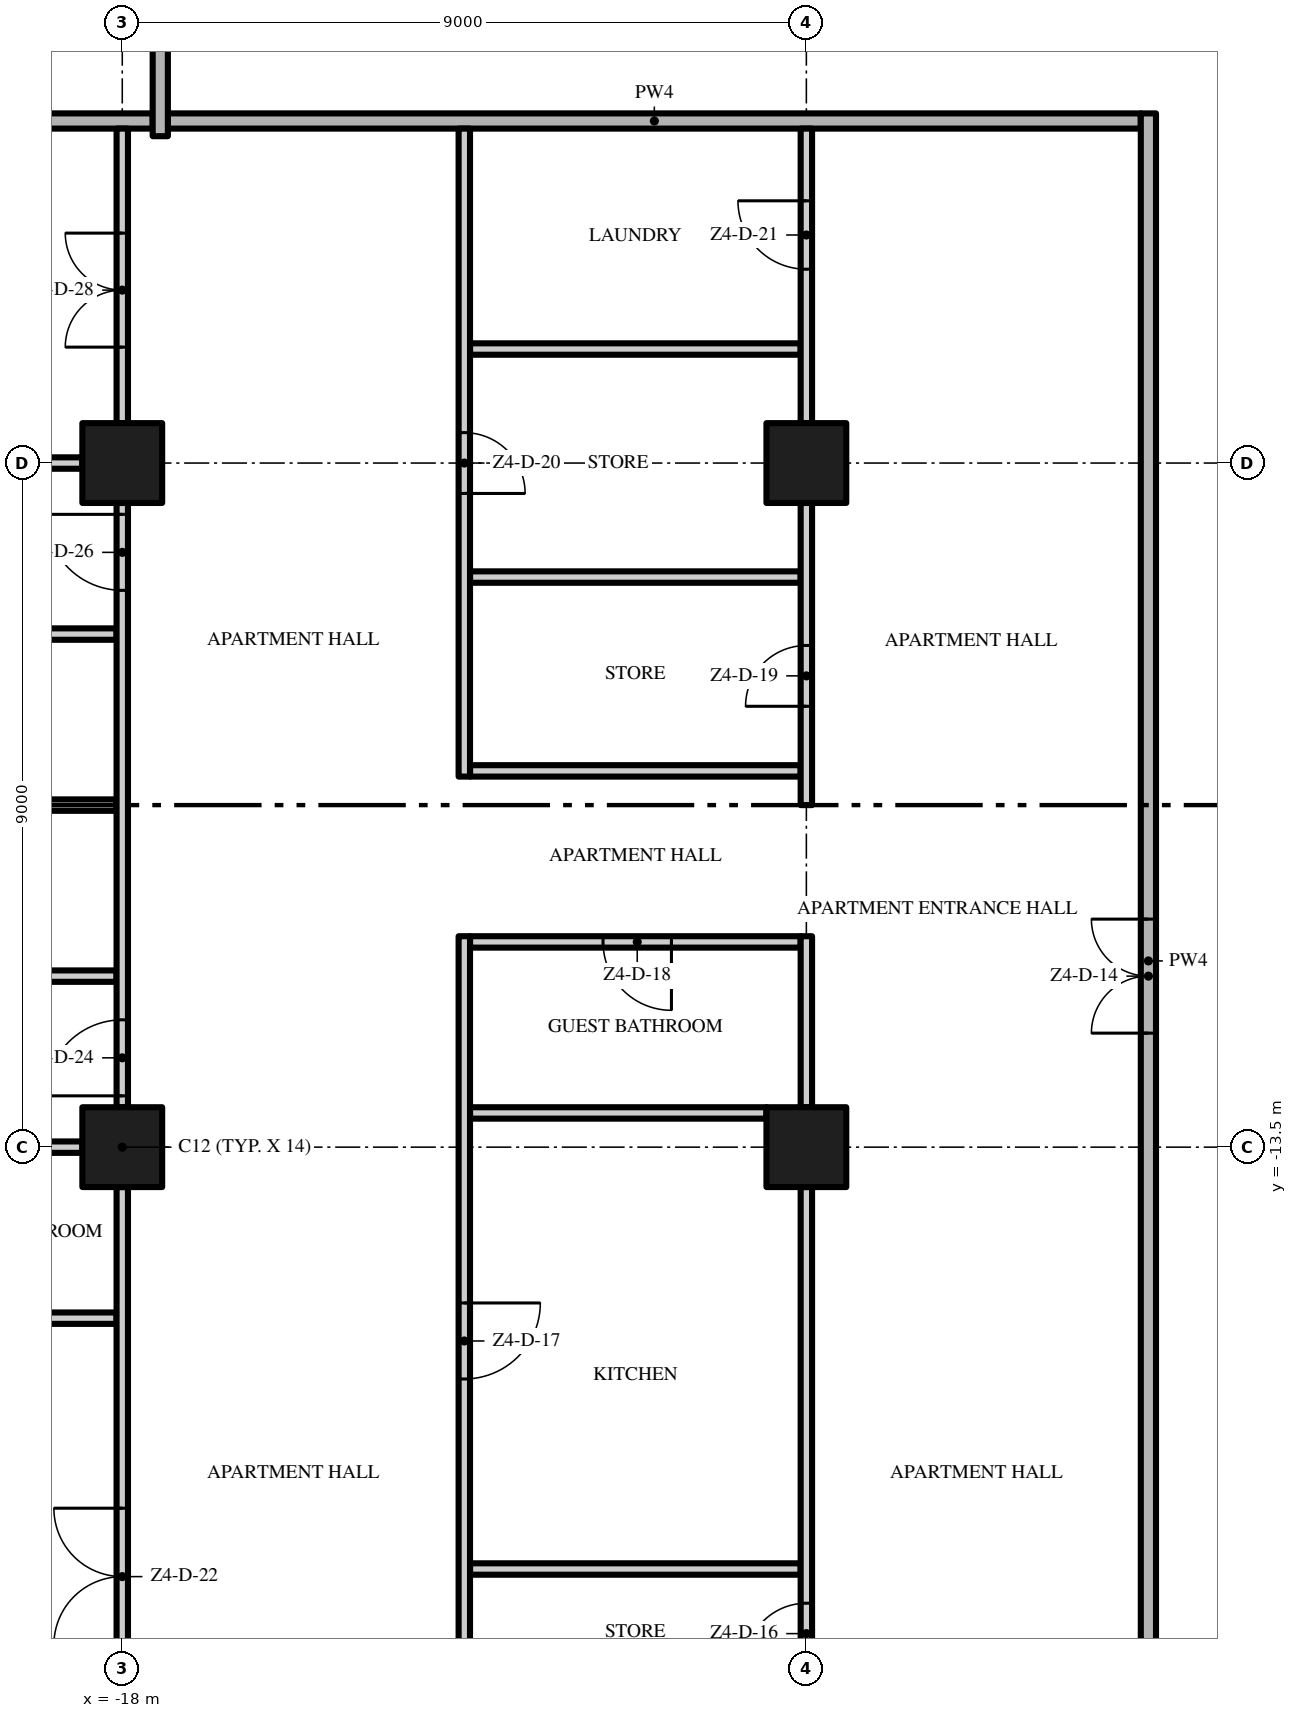
"""IFC4 building model, lengths in metres.
Left out: names, types, materials, properties, quantities, classifications, styles, units other than length and angle.
Written with IfcOpenShell. Run it as: python <this file> out.ifc"""

import sys

from ifc_helpers import new_model, si_unit, direction, frame, frame_2d, origin, origin_2d, place, context, subcontext, project, spatial, rectangle, extrude, element, fill, save


model = new_model("IFC4")
c1 = context("Model", 3, precision=1e-05, world=origin(), true_north=direction((0.0, 1.0)))
c2 = subcontext(c1, "Body", "Model", "MODEL_VIEW")
j1 = project(units=[si_unit("LENGTHUNIT", "METRE"), si_unit("PLANEANGLEUNIT", "RADIAN")], contexts=[c1])
p1 = place(None, origin())
s1 = spatial("IfcSite", under=j1, at=p1, CompositionType="ELEMENT")
p2 = place(p1, origin())
s2 = spatial("IfcBuilding", under=s1, at=p2, CompositionType="ELEMENT")
p3 = place(p2, frame((0.0, 0.0, 222.4)))
s3 = spatial("IfcBuildingStorey", under=s2, at=p3, CompositionType="ELEMENT", Elevation=222.4)
for number, where, z_axis, x_axis in (
    (1, (-18.0, -13.5, 0.0), (0.0, 0.0, 1.0), (1.0, 0.0, 0.0)),
    (2, (-18.0, -4.5, 0.0), (0.0, 0.0, 1.0), (1.0, 0.0, 0.0)),
    (3, (-9.0, -13.5, 0.0), (0.0, 0.0, 1.0), (1.0, 0.0, 0.0)),
    (4, (-9.0, -4.5, 0.0), (0.0, 0.0, 1.0), (1.0, 0.0, 0.0)),
):
    element("IfcColumn", number, at=place(p3, frame(where, z_axis=z_axis, x_axis=x_axis)), inside=s3, PredefinedType="COLUMN", context=c2, shape_type="SweptSolid", body=[
        extrude(rectangle(XDim=1.05, YDim=1.05, at=origin_2d()), origin(), (0.0, 0.0, 1.0), 3.5),
    ])
p4 = place(p3, frame((-13.425, -19.05, 0.0), z_axis=(0.0, 0.0, 1.0), x_axis=(1.0, 0.0, 0.0)))
e5 = element("IfcWall", 5, at=p4, inside=s3, PredefinedType="PARTITIONING", context=c2, shape_type="SweptSolid", body=[
    extrude(rectangle(XDim=4.35, YDim=0.15, at=frame_2d((2.175, 0.0))), origin(), (0.0, 0.0, 1.0), 3.5),
])
p5 = place(p3, frame((-20.925, -15.75, 0.0), z_axis=(0.0, 0.0, 1.0), x_axis=(1.0, 0.0, 0.0)))
e6 = element("IfcWall", 6, at=p5, inside=s3, PredefinedType="PARTITIONING", context=c2, shape_type="SweptSolid", body=[
    extrude(rectangle(XDim=2.85, YDim=0.15, at=frame_2d((1.425, 0.0))), origin(), (0.0, 0.0, 1.0), 3.5),
])
p6 = place(p3, frame((-26.05, -13.5, 0.0), z_axis=(0.0, 0.0, 1.0), x_axis=(1.0, 0.0, 0.0)))
e7 = element("IfcWall", 7, at=p6, inside=s3, PredefinedType="PARTITIONING", context=c2, shape_type="SweptSolid", body=[
    extrude(rectangle(XDim=7.525, YDim=0.15, at=frame_2d((3.763, 0.0))), origin(), (0.0, 0.0, 1.0), 3.5),
])
p7 = place(p3, frame((-13.425, -13.05, 0.0), z_axis=(0.0, 0.0, 1.0), x_axis=(1.0, 0.0, 0.0)))
e8 = element("IfcWall", 8, at=p7, inside=s3, PredefinedType="PARTITIONING", context=c2, shape_type="SweptSolid", body=[
    extrude(rectangle(XDim=3.9, YDim=0.15, at=frame_2d((1.95, 0.0))), origin(), (0.0, 0.0, 1.0), 3.5),
])
p8 = place(p3, frame((-20.925, -11.25, 0.0), z_axis=(0.0, 0.0, 1.0), x_axis=(1.0, 0.0, 0.0)))
e9 = element("IfcWall", 9, at=p8, inside=s3, PredefinedType="PARTITIONING", context=c2, shape_type="SweptSolid", body=[
    extrude(rectangle(XDim=2.85, YDim=0.15, at=frame_2d((1.425, 0.0))), origin(), (0.0, 0.0, 1.0), 3.5),
])
p9 = place(p3, frame((-9.075, -10.8, 0.0), z_axis=(0.0, 0.0, 1.0), x_axis=(-1.0, 0.0, 0.0)))
e10 = element("IfcWall", 10, at=p9, inside=s3, PredefinedType="PARTITIONING", context=c2, shape_type="SweptSolid", body=[
    extrude(rectangle(XDim=4.35, YDim=0.15, at=frame_2d((2.175, 0.0))), origin(), (0.0, 0.0, 1.0), 3.5),
])
p10 = place(p9, frame((1.7, 0.0, 0.0)))
e11 = element("IfcOpeningElement", 11, at=p10, cuts=e10, PredefinedType="OPENING", context=c2, shape_type="SweptSolid", body=[
    extrude(rectangle(XDim=0.9, YDim=2.1, at=frame_2d((0.45, 1.05))), frame((0.0, 0.085, 0.0), z_axis=(0.0, -1.0, 0.0), x_axis=(1.0, 0.0, 0.0)), (0.0, 0.0, 1.0), 0.17),
])
p11 = place(p3, frame((-20.925, -9.0, 0.0), z_axis=(0.0, 0.0, 1.0), x_axis=(1.0, 0.0, 0.0)))
e12 = element("IfcWall", 12, at=p11, inside=s3, PredefinedType="PARTITIONING", context=c2, shape_type="SweptSolid", body=[
    extrude(rectangle(XDim=2.85, YDim=0.15, at=frame_2d((1.425, 0.0))), origin(), (0.0, 0.0, 1.0), 3.5),
])
p12 = place(p3, frame((-13.425, -8.55, 0.0), z_axis=(0.0, 0.0, 1.0), x_axis=(1.0, 0.0, 0.0)))
e13 = element("IfcWall", 13, at=p12, inside=s3, PredefinedType="PARTITIONING", context=c2, shape_type="SweptSolid", body=[
    extrude(rectangle(XDim=4.35, YDim=0.15, at=frame_2d((2.175, 0.0))), origin(), (0.0, 0.0, 1.0), 3.5),
])
p13 = place(p3, frame((-20.925, -6.75, 0.0), z_axis=(0.0, 0.0, 1.0), x_axis=(1.0, 0.0, 0.0)))
e14 = element("IfcWall", 14, at=p13, inside=s3, PredefinedType="PARTITIONING", context=c2, shape_type="SweptSolid", body=[
    extrude(rectangle(XDim=2.85, YDim=0.15, at=frame_2d((1.425, 0.0))), origin(), (0.0, 0.0, 1.0), 3.5),
])
p14 = place(p3, frame((-13.425, -6.0, 0.0), z_axis=(0.0, 0.0, 1.0), x_axis=(1.0, 0.0, 0.0)))
e15 = element("IfcWall", 15, at=p14, inside=s3, PredefinedType="PARTITIONING", context=c2, shape_type="SweptSolid", body=[
    extrude(rectangle(XDim=4.35, YDim=0.15, at=frame_2d((2.175, 0.0))), origin(), (0.0, 0.0, 1.0), 3.5),
])
p15 = place(p3, frame((-26.05, -4.5, 0.0), z_axis=(0.0, 0.0, 1.0), x_axis=(1.0, 0.0, 0.0)))
e16 = element("IfcWall", 16, at=p15, inside=s3, PredefinedType="PARTITIONING", context=c2, shape_type="SweptSolid", body=[
    extrude(rectangle(XDim=7.525, YDim=0.15, at=frame_2d((3.763, 0.0))), origin(), (0.0, 0.0, 1.0), 3.5),
])
p16 = place(p3, frame((-13.425, -3.0, 0.0), z_axis=(0.0, 0.0, 1.0), x_axis=(1.0, 0.0, 0.0)))
e17 = element("IfcWall", 17, at=p16, inside=s3, PredefinedType="PARTITIONING", context=c2, shape_type="SweptSolid", body=[
    extrude(rectangle(XDim=4.35, YDim=0.15, at=frame_2d((2.175, 0.0))), origin(), (0.0, 0.0, 1.0), 3.5),
])
p17 = place(p3, frame((-17.4, 0.0, 0.0), z_axis=(0.0, 0.0, 1.0), x_axis=(1.0, 0.0, 0.0)))
e18 = element("IfcWall", 18, at=p17, inside=s3, PredefinedType="PARTITIONING", context=c2, shape_type="SweptSolid", body=[
    extrude(rectangle(XDim=12.8, YDim=0.2, at=frame_2d((6.4, 0.0))), origin(), (0.0, 0.0, 1.0), 3.5),
])
p18 = place(p3, frame((-26.7, 0.0, 0.0), z_axis=(0.0, 0.0, 1.0), x_axis=(1.0, 0.0, 0.0)))
e19 = element("IfcWall", 19, at=p18, inside=s3, PredefinedType="PARTITIONING", context=c2, shape_type="SweptSolid", body=[
    extrude(rectangle(XDim=9.1, YDim=0.2, at=frame_2d((4.55, 0.0))), origin(), (0.0, 0.0, 1.0), 3.5),
])
p19 = place(p3, frame((-18.0, -21.55, 0.0), z_axis=(0.0, 0.0, 1.0), x_axis=(0.0, 1.0, 0.0)))
e20 = element("IfcWall", 20, at=p19, inside=s3, PredefinedType="PARTITIONING", context=c2, shape_type="SweptSolid", body=[
    extrude(rectangle(XDim=7.525, YDim=0.15, at=frame_2d((3.763, 0.0))), origin(), (0.0, 0.0, 1.0), 3.5),
])
p20 = place(p19, frame((1.5, 0.0, 0.0)))
e21 = element("IfcOpeningElement", 21, at=p20, cuts=e20, PredefinedType="OPENING", context=c2, shape_type="SweptSolid", body=[
    extrude(rectangle(XDim=1.8, YDim=2.4, at=frame_2d((0.9, 1.2))), frame((0.0, 0.085, 0.0), z_axis=(0.0, -1.0, 0.0), x_axis=(1.0, 0.0, 0.0)), (0.0, 0.0, 1.0), 0.17),
])
p21 = place(p3, frame((-18.0, -12.975, 0.0), z_axis=(0.0, 0.0, 1.0), x_axis=(0.0, 1.0, 0.0)))
e22 = element("IfcWall", 22, at=p21, inside=s3, PredefinedType="PARTITIONING", context=c2, shape_type="SweptSolid", body=[
    extrude(rectangle(XDim=7.95, YDim=0.15, at=frame_2d((3.975, 0.0))), origin(), (0.0, 0.0, 1.0), 3.5),
])
p22 = place(p21, frame((0.15, 0.0, 0.0)))
e23 = element("IfcOpeningElement", 23, at=p22, cuts=e22, PredefinedType="OPENING", context=c2, shape_type="SweptSolid", body=[
    extrude(rectangle(XDim=1.0, YDim=2.4, at=frame_2d((0.5, 1.2))), frame((0.0, 0.085, 0.0), z_axis=(0.0, -1.0, 0.0), x_axis=(1.0, 0.0, 0.0)), (0.0, 0.0, 1.0), 0.17),
])
p23 = place(p21, frame((6.8, 0.0, 0.0)))
e24 = element("IfcOpeningElement", 24, at=p23, cuts=e22, PredefinedType="OPENING", context=c2, shape_type="SweptSolid", body=[
    extrude(rectangle(XDim=1.0, YDim=2.4, at=frame_2d((0.5, 1.2))), frame((0.0, 0.085, 0.0), z_axis=(0.0, -1.0, 0.0), x_axis=(1.0, 0.0, 0.0)), (0.0, 0.0, 1.0), 0.17),
])
p24 = place(p3, frame((-18.0, -3.975, 0.0), z_axis=(0.0, 0.0, 1.0), x_axis=(0.0, 1.0, 0.0)))
e25 = element("IfcWall", 25, at=p24, inside=s3, PredefinedType="PARTITIONING", context=c2, shape_type="SweptSolid", body=[
    extrude(rectangle(XDim=3.875, YDim=0.15, at=frame_2d((1.938, 0.0))), origin(), (0.0, 0.0, 1.0), 3.5),
])
p25 = place(p24, frame((1.0, 0.0, 0.0)))
e26 = element("IfcOpeningElement", 26, at=p25, cuts=e25, PredefinedType="OPENING", context=c2, shape_type="SweptSolid", body=[
    extrude(rectangle(XDim=1.5, YDim=2.4, at=frame_2d((0.75, 1.2))), frame((0.0, 0.085, 0.0), z_axis=(0.0, -1.0, 0.0), x_axis=(1.0, 0.0, 0.0)), (0.0, 0.0, 1.0), 0.17),
])
p26 = place(p3, frame((-17.5, -0.2, 0.0), z_axis=(0.0, 0.0, 1.0), x_axis=(0.0, 1.0, 0.0)))
e27 = element("IfcWall", 27, at=p26, inside=s3, PredefinedType="PARTITIONING", context=c2, shape_type="SweptSolid", body=[
    extrude(rectangle(XDim=4.175, YDim=0.2, at=frame_2d((2.087, 0.0))), origin(), (0.0, 0.0, 1.0), 3.5),
])
p27 = place(p3, frame((-13.5, -10.725, 0.0), z_axis=(0.0, 0.0, 1.0), x_axis=(0.0, -1.0, 0.0)))
e28 = element("IfcWall", 28, at=p27, inside=s3, PredefinedType="PARTITIONING", context=c2, shape_type="SweptSolid", body=[
    extrude(rectangle(XDim=11.475, YDim=0.15, at=frame_2d((5.737, 0.0))), origin(), (0.0, 0.0, 1.0), 3.5),
])
p28 = place(p27, frame((10.475, 0.0, 0.0)))
e29 = element("IfcOpeningElement", 29, at=p28, cuts=e28, PredefinedType="OPENING", context=c2, shape_type="SweptSolid", body=[
    extrude(rectangle(XDim=0.8, YDim=2.0, at=frame_2d((0.4, 1.0))), frame((0.0, 0.085, 0.0), z_axis=(0.0, -1.0, 0.0), x_axis=(1.0, 0.0, 0.0)), (0.0, 0.0, 1.0), 0.17),
])
p29 = place(p27, frame((4.825, 0.0, 0.0)))
e30 = element("IfcOpeningElement", 30, at=p29, cuts=e28, PredefinedType="OPENING", context=c2, shape_type="SweptSolid", body=[
    extrude(rectangle(XDim=1.0, YDim=2.4, at=frame_2d((0.5, 1.2))), frame((0.0, 0.085, 0.0), z_axis=(0.0, -1.0, 0.0), x_axis=(1.0, 0.0, 0.0)), (0.0, 0.0, 1.0), 0.17),
])
p30 = place(p3, frame((-13.5, -0.1, 0.0), z_axis=(0.0, 0.0, 1.0), x_axis=(0.0, -1.0, 0.0)))
e31 = element("IfcWall", 31, at=p30, inside=s3, PredefinedType="PARTITIONING", context=c2, shape_type="SweptSolid", body=[
    extrude(rectangle(XDim=8.525, YDim=0.15, at=frame_2d((4.263, 0.0))), origin(), (0.0, 0.0, 1.0), 3.5),
])
p31 = place(p30, frame((4.0, 0.0, 0.0)))
e32 = element("IfcOpeningElement", 32, at=p31, cuts=e31, PredefinedType="OPENING", context=c2, shape_type="SweptSolid", body=[
    extrude(rectangle(XDim=0.8, YDim=2.0, at=frame_2d((0.4, 1.0))), frame((0.0, 0.085, 0.0), z_axis=(0.0, -1.0, 0.0), x_axis=(1.0, 0.0, 0.0)), (0.0, 0.0, 1.0), 0.17),
])
p32 = place(p3, frame((-9.0, -21.55, 0.0), z_axis=(0.0, 0.0, 1.0), x_axis=(0.0, 1.0, 0.0)))
e33 = element("IfcWall", 33, at=p32, inside=s3, PredefinedType="PARTITIONING", context=c2, shape_type="SweptSolid", body=[
    extrude(rectangle(XDim=7.525, YDim=0.15, at=frame_2d((3.763, 0.0))), origin(), (0.0, 0.0, 1.0), 3.5),
])
p33 = place(p32, frame((1.25, 0.0, 0.0)))
e34 = element("IfcOpeningElement", 34, at=p33, cuts=e33, PredefinedType="OPENING", context=c2, shape_type="SweptSolid", body=[
    extrude(rectangle(XDim=0.8, YDim=2.0, at=frame_2d((0.4, 1.0))), frame((0.0, 0.085, 0.0), z_axis=(0.0, -1.0, 0.0), x_axis=(1.0, 0.0, 0.0)), (0.0, 0.0, 1.0), 0.17),
])
p34 = place(p3, frame((-9.0, -12.975, 0.0), z_axis=(0.0, 0.0, 1.0), x_axis=(0.0, 1.0, 0.0)))
e35 = element("IfcWall", 35, at=p34, inside=s3, PredefinedType="PARTITIONING", context=c2, shape_type="SweptSolid", body=[
    extrude(rectangle(XDim=2.25, YDim=0.15, at=frame_2d((1.125, 0.0))), origin(), (0.0, 0.0, 1.0), 3.5),
])
p35 = place(p3, frame((-9.0, -9.0, 0.0), z_axis=(0.0, 0.0, 1.0), x_axis=(0.0, 1.0, 0.0)))
e36 = element("IfcWall", 36, at=p35, inside=s3, PredefinedType="PARTITIONING", context=c2, shape_type="SweptSolid", body=[
    extrude(rectangle(XDim=3.975, YDim=0.15, at=frame_2d((1.988, 0.0))), origin(), (0.0, 0.0, 1.0), 3.5),
])
p36 = place(p35, frame((1.3, 0.0, 0.0)))
e37 = element("IfcOpeningElement", 37, at=p36, cuts=e36, PredefinedType="OPENING", context=c2, shape_type="SweptSolid", body=[
    extrude(rectangle(XDim=0.8, YDim=2.0, at=frame_2d((0.4, 1.0))), frame((0.0, 0.085, 0.0), z_axis=(0.0, -1.0, 0.0), x_axis=(1.0, 0.0, 0.0)), (0.0, 0.0, 1.0), 0.17),
])
p37 = place(p3, frame((-9.0, -3.975, 0.0), z_axis=(0.0, 0.0, 1.0), x_axis=(0.0, 1.0, 0.0)))
e38 = element("IfcWall", 38, at=p37, inside=s3, PredefinedType="PARTITIONING", context=c2, shape_type="SweptSolid", body=[
    extrude(rectangle(XDim=3.875, YDim=0.15, at=frame_2d((1.938, 0.0))), origin(), (0.0, 0.0, 1.0), 3.5),
])
p38 = place(p37, frame((2.025, 0.0, 0.0)))
e39 = element("IfcOpeningElement", 39, at=p38, cuts=e38, PredefinedType="OPENING", context=c2, shape_type="SweptSolid", body=[
    extrude(rectangle(XDim=0.9, YDim=2.1, at=frame_2d((0.45, 1.05))), frame((0.0, 0.085, 0.0), z_axis=(0.0, -1.0, 0.0), x_axis=(1.0, 0.0, 0.0)), (0.0, 0.0, 1.0), 0.17),
])
p39 = place(p3, frame((-4.5, -22.2, 0.0), z_axis=(0.0, 0.0, 1.0), x_axis=(0.0, 1.0, 0.0)))
e40 = element("IfcWall", 40, at=p39, inside=s3, PredefinedType="PARTITIONING", context=c2, shape_type="SweptSolid", body=[
    extrude(rectangle(XDim=22.3, YDim=0.2, at=frame_2d((11.15, 0.0))), origin(), (0.0, 0.0, 1.0), 3.5),
])
p40 = place(p39, frame((10.2, 0.0, 0.0)))
e41 = element("IfcOpeningElement", 41, at=p40, cuts=e40, PredefinedType="OPENING", context=c2, shape_type="SweptSolid", body=[
    extrude(rectangle(XDim=1.5, YDim=2.4, at=frame_2d((0.75, 1.2))), frame((0.0, 0.11, 0.0), z_axis=(0.0, -1.0, 0.0), x_axis=(1.0, 0.0, 0.0)), (0.0, 0.0, 1.0), 0.22),
])
p41 = place(p40, origin())
e42 = element("IfcDoor", 42, at=p41, inside=s3, OperationType="DOUBLE_DOOR_SINGLE_SWING", PredefinedType="DOOR", context=c2, shape_type="SweptSolid", body=[
    extrude(rectangle(XDim=1.5, YDim=2.4, at=frame_2d((0.75, 1.2))), frame((0.0, 0.025, 0.0), z_axis=(0.0, -1.0, 0.0), x_axis=(1.0, 0.0, 0.0)), (0.0, 0.0, 1.0), 0.05),
])
fill(e41, e42)
p42 = place(p33, origin())
e43 = element("IfcDoor", 43, at=p42, inside=s3, OperationType="SINGLE_SWING_LEFT", PredefinedType="DOOR", context=c2, shape_type="SweptSolid", body=[
    extrude(rectangle(XDim=0.8, YDim=2.0, at=frame_2d((0.4, 1.0))), frame((0.0, 0.025, 0.0), z_axis=(0.0, -1.0, 0.0), x_axis=(1.0, 0.0, 0.0)), (0.0, 0.0, 1.0), 0.05),
])
fill(e34, e43)
p43 = place(p29, origin())
e44 = element("IfcDoor", 44, at=p43, inside=s3, OperationType="SINGLE_SWING_LEFT", PredefinedType="DOOR", context=c2, shape_type="SweptSolid", body=[
    extrude(rectangle(XDim=1.0, YDim=2.4, at=frame_2d((0.5, 1.2))), frame((0.0, 0.025, 0.0), z_axis=(0.0, -1.0, 0.0), x_axis=(1.0, 0.0, 0.0)), (0.0, 0.0, 1.0), 0.05),
])
fill(e30, e44)
p44 = place(p10, origin())
e45 = element("IfcDoor", 45, at=p44, inside=s3, OperationType="SINGLE_SWING_LEFT", PredefinedType="DOOR", context=c2, shape_type="SweptSolid", body=[
    extrude(rectangle(XDim=0.9, YDim=2.1, at=frame_2d((0.45, 1.05))), frame((0.0, 0.025, 0.0), z_axis=(0.0, -1.0, 0.0), x_axis=(1.0, 0.0, 0.0)), (0.0, 0.0, 1.0), 0.05),
])
fill(e11, e45)
p45 = place(p36, origin())
e46 = element("IfcDoor", 46, at=p45, inside=s3, OperationType="SINGLE_SWING_LEFT", PredefinedType="DOOR", context=c2, shape_type="SweptSolid", body=[
    extrude(rectangle(XDim=0.8, YDim=2.0, at=frame_2d((0.4, 1.0))), frame((0.0, 0.025, 0.0), z_axis=(0.0, -1.0, 0.0), x_axis=(1.0, 0.0, 0.0)), (0.0, 0.0, 1.0), 0.05),
])
fill(e37, e46)
p46 = place(p31, origin())
e47 = element("IfcDoor", 47, at=p46, inside=s3, OperationType="SINGLE_SWING_RIGHT", PredefinedType="DOOR", context=c2, shape_type="SweptSolid", body=[
    extrude(rectangle(XDim=0.8, YDim=2.0, at=frame_2d((0.4, 1.0))), frame((0.0, 0.025, 0.0), z_axis=(0.0, -1.0, 0.0), x_axis=(1.0, 0.0, 0.0)), (0.0, 0.0, 1.0), 0.05),
])
fill(e32, e47)
p47 = place(p38, origin())
e48 = element("IfcDoor", 48, at=p47, inside=s3, OperationType="SINGLE_SWING_RIGHT", PredefinedType="DOOR", context=c2, shape_type="SweptSolid", body=[
    extrude(rectangle(XDim=0.9, YDim=2.1, at=frame_2d((0.45, 1.05))), frame((0.0, 0.025, 0.0), z_axis=(0.0, -1.0, 0.0), x_axis=(1.0, 0.0, 0.0)), (0.0, 0.0, 1.0), 0.05),
])
fill(e39, e48)
p48 = place(p20, origin())
e49 = element("IfcDoor", 49, at=p48, inside=s3, OperationType="DOUBLE_DOOR_SINGLE_SWING", PredefinedType="DOOR", context=c2, shape_type="SweptSolid", body=[
    extrude(rectangle(XDim=1.8, YDim=2.4, at=frame_2d((0.9, 1.2))), frame((0.0, 0.025, 0.0), z_axis=(0.0, -1.0, 0.0), x_axis=(1.0, 0.0, 0.0)), (0.0, 0.0, 1.0), 0.05),
])
fill(e21, e49)
p49 = place(p22, origin())
e50 = element("IfcDoor", 50, at=p49, inside=s3, OperationType="SINGLE_SWING_LEFT", PredefinedType="DOOR", context=c2, shape_type="SweptSolid", body=[
    extrude(rectangle(XDim=1.0, YDim=2.4, at=frame_2d((0.5, 1.2))), frame((0.0, 0.025, 0.0), z_axis=(0.0, -1.0, 0.0), x_axis=(1.0, 0.0, 0.0)), (0.0, 0.0, 1.0), 0.05),
])
fill(e23, e50)
p50 = place(p23, origin())
e51 = element("IfcDoor", 51, at=p50, inside=s3, OperationType="SINGLE_SWING_RIGHT", PredefinedType="DOOR", context=c2, shape_type="SweptSolid", body=[
    extrude(rectangle(XDim=1.0, YDim=2.4, at=frame_2d((0.5, 1.2))), frame((0.0, 0.025, 0.0), z_axis=(0.0, -1.0, 0.0), x_axis=(1.0, 0.0, 0.0)), (0.0, 0.0, 1.0), 0.05),
])
fill(e24, e51)
p51 = place(p25, origin())
e52 = element("IfcDoor", 52, at=p51, inside=s3, OperationType="DOUBLE_DOOR_SINGLE_SWING", PredefinedType="DOOR", context=c2, shape_type="SweptSolid", body=[
    extrude(rectangle(XDim=1.5, YDim=2.4, at=frame_2d((0.75, 1.2))), frame((0.0, 0.025, 0.0), z_axis=(0.0, -1.0, 0.0), x_axis=(1.0, 0.0, 0.0)), (0.0, 0.0, 1.0), 0.05),
])
fill(e26, e52)
save(model, sys.argv[1])
